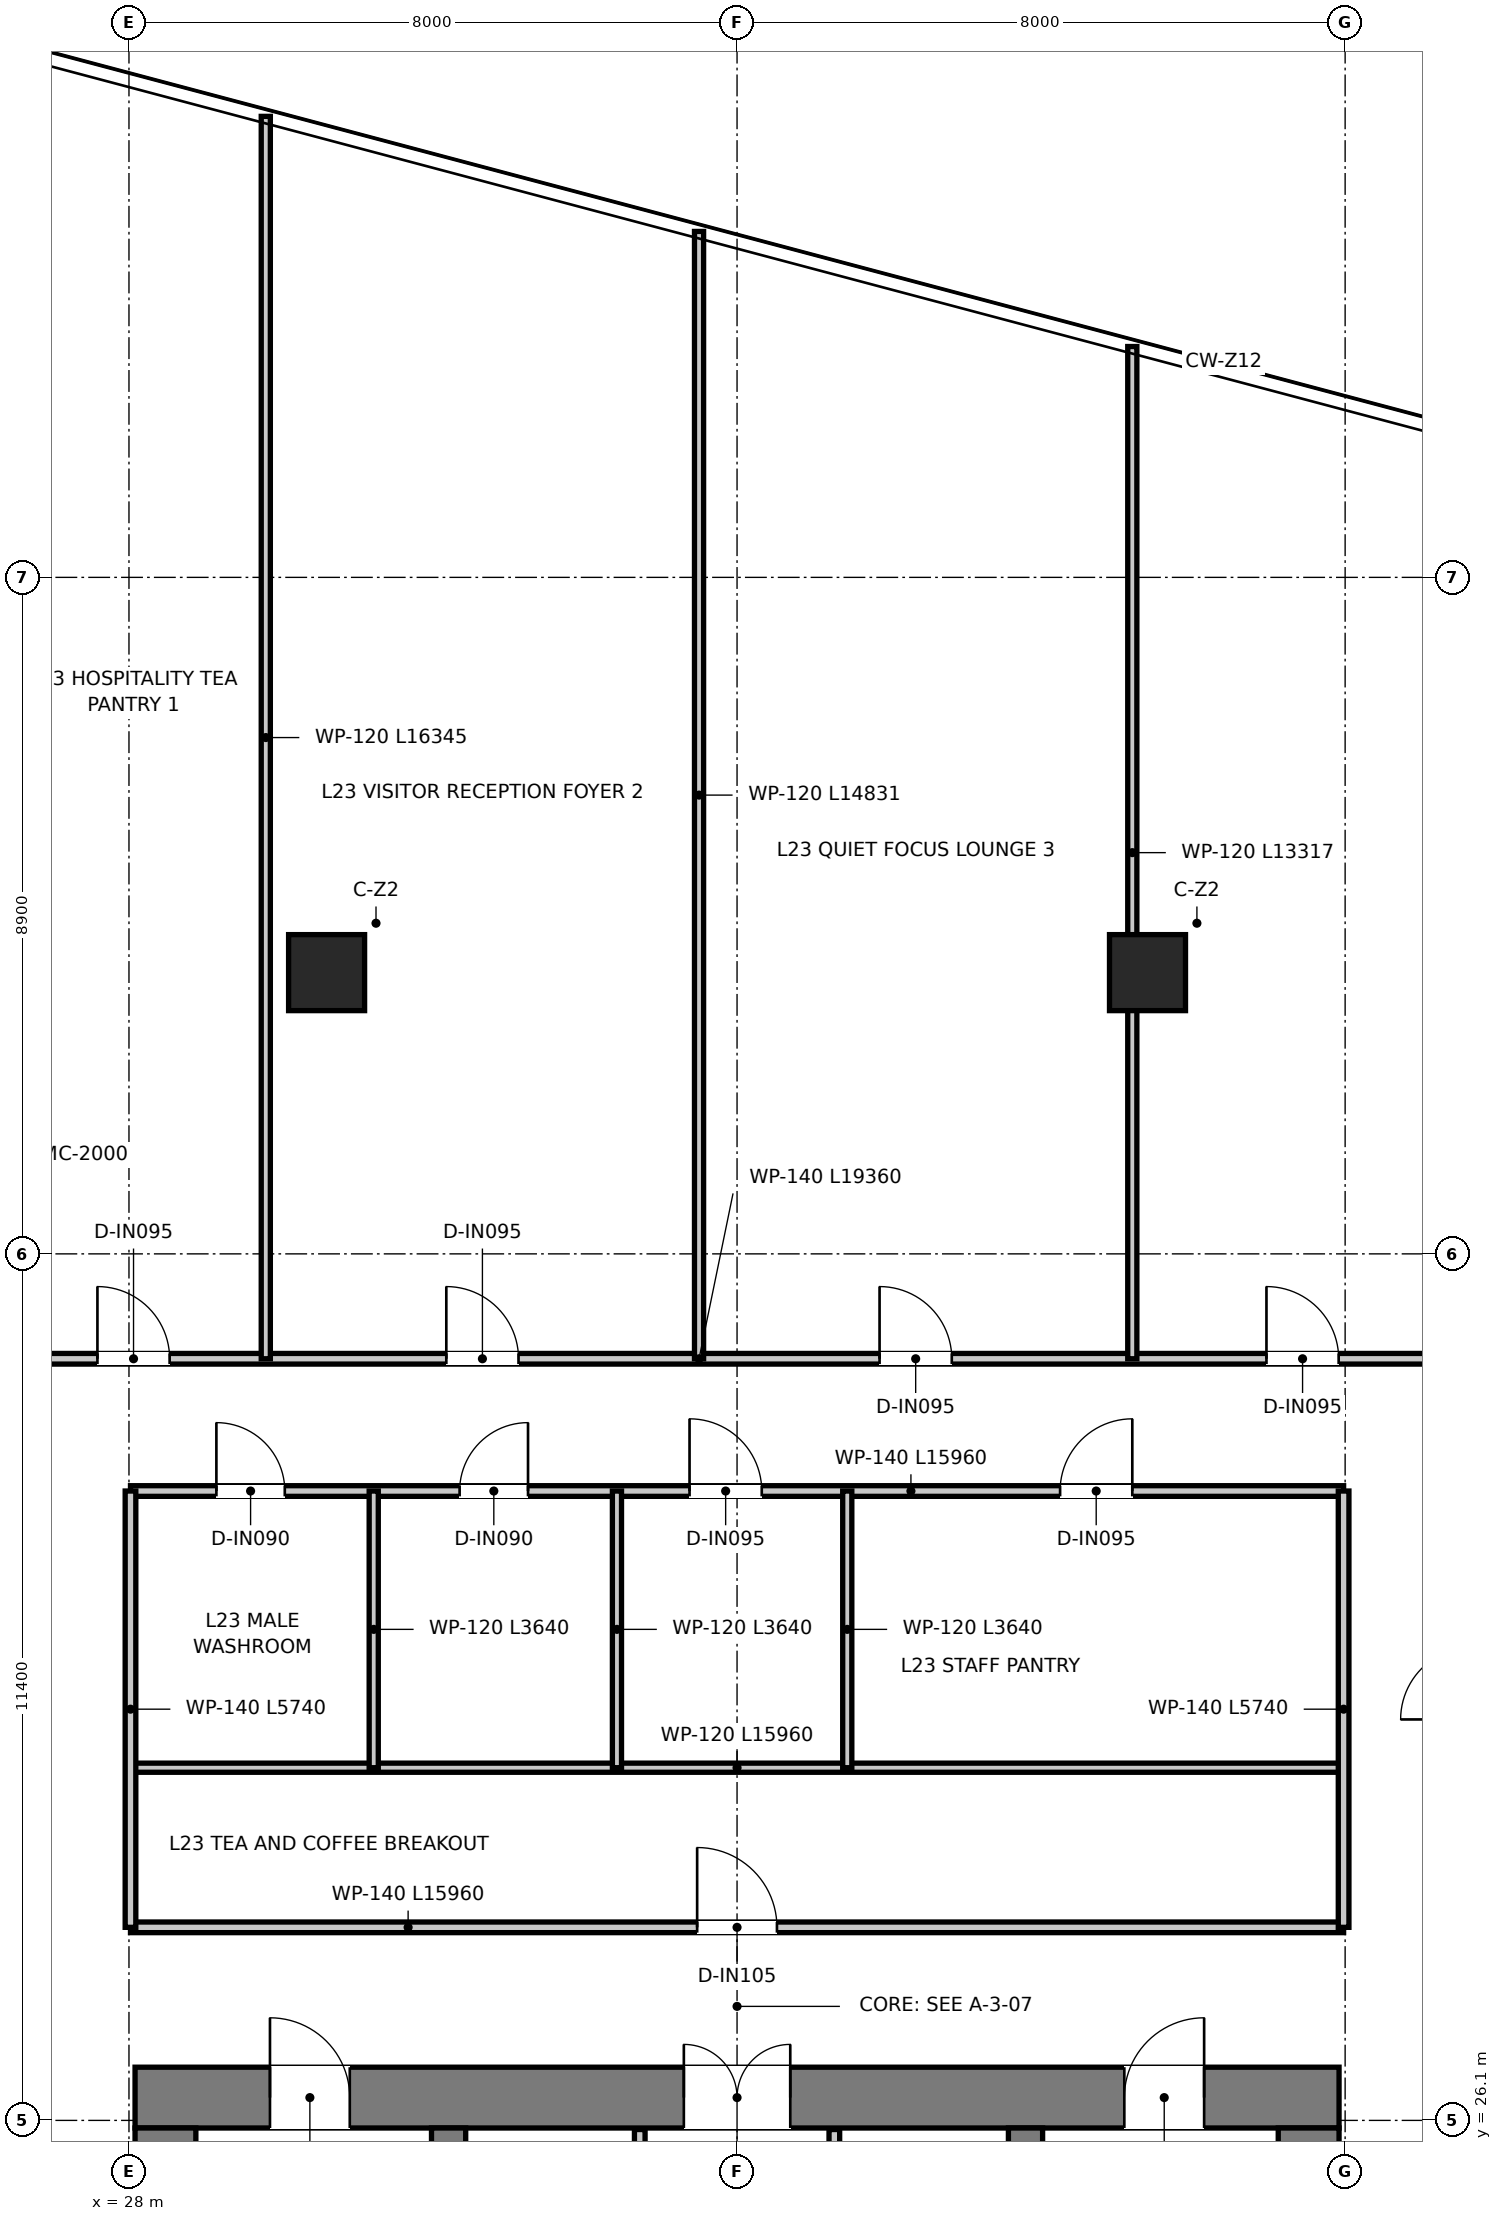
"""IFC4 building model, lengths in metres.
Left out: names, types, materials, properties, quantities, classifications, styles, units other than length and angle.
Written with IfcOpenShell. Run it as: python <this file> out.ifc"""

import sys

from ifc_helpers import new_model, si_unit, direction, frame, frame_2d, origin, origin_2d, place, context, subcontext, project, spatial, rectangle, extrude, source, transform, mapped, element, fill, save


model = new_model("IFC4")
c1 = context("Model", 3, precision=1e-05, world=origin(), true_north=direction((0.0, 1.0)))
c2 = subcontext(c1, "Body", "Model", "MODEL_VIEW")
j1 = project(units=[si_unit("LENGTHUNIT", "METRE"), si_unit("PLANEANGLEUNIT", "RADIAN")], contexts=[c1])
p1 = place(None, origin())
s1 = spatial("IfcSite", under=j1, at=p1, CompositionType="ELEMENT")
p2 = place(p1, origin())
s2 = spatial("IfcBuilding", under=s1, at=p2, CompositionType="ELEMENT")
p3 = place(p2, frame((0.0, 0.0, 97.95)))
s3 = spatial("IfcBuildingStorey", under=s2, at=p3, CompositionType="ELEMENT", Elevation=97.95)
p4 = place(p3, frame((28.08, 26.4, 0.0), z_axis=(0.0, 0.0, 1.0), x_axis=(1.0, 0.0, 0.0)))
e1 = element("IfcWall", 1, at=p4, inside=s3, PredefinedType="SHEAR", context=c2, shape_type="SweptSolid", body=[
    extrude(rectangle(XDim=15.84, YDim=0.8, at=frame_2d((7.92, 0.0))), origin(), (0.0, 0.0, 1.0), 3.95),
])
p5 = place(p4, frame((7.22, 0.0, 0.0)))
e2 = element("IfcOpeningElement", 2, at=p5, cuts=e1, PredefinedType="OPENING", context=c2, shape_type="SweptSolid", body=[
    extrude(rectangle(XDim=1.4, YDim=2.2, at=frame_2d((0.7, 1.1))), frame((0.0, 0.41, 0.0), z_axis=(0.0, -1.0, 0.0), x_axis=(1.0, 0.0, 0.0)), (0.0, 0.0, 1.0), 0.82),
])
p6 = place(p4, frame((1.775, 0.0, 0.0)))
e3 = element("IfcOpeningElement", 3, at=p6, cuts=e1, PredefinedType="OPENING", context=c2, shape_type="SweptSolid", body=[
    extrude(rectangle(XDim=1.05, YDim=2.1, at=frame_2d((0.525, 1.05))), frame((0.0, 0.41, 0.0), z_axis=(0.0, -1.0, 0.0), x_axis=(1.0, 0.0, 0.0)), (0.0, 0.0, 1.0), 0.82),
])
p7 = place(p4, frame((13.015, 0.0, 0.0)))
e4 = element("IfcOpeningElement", 4, at=p7, cuts=e1, PredefinedType="OPENING", context=c2, shape_type="SweptSolid", body=[
    extrude(rectangle(XDim=1.05, YDim=2.1, at=frame_2d((0.525, 1.05))), frame((0.0, 0.41, 0.0), z_axis=(0.0, -1.0, 0.0), x_axis=(1.0, 0.0, 0.0)), (0.0, 0.0, 1.0), 0.82),
])
for number, where, z_axis, x_axis in (
    (5, (28.48, 11.3, 0.0), (0.0, 0.0, 1.0), (0.0, 1.0, 0.0)),
    (6, (43.52, 11.3, 0.0), (0.0, 0.0, 1.0), (0.0, 1.0, 0.0)),
):
    element("IfcWall", number, at=place(p3, frame(where, z_axis=z_axis, x_axis=x_axis)), inside=s3, PredefinedType="SHEAR", context=c2, shape_type="SweptSolid", body=[
        extrude(rectangle(XDim=14.7, YDim=0.8, at=frame_2d((7.35, 0.0))), origin(), (0.0, 0.0, 1.0), 3.95),
    ])
p8 = place(p3, frame((32.205, 13.22, 0.0), z_axis=(0.0, 0.0, 1.0), x_axis=(0.0, 1.0, 0.0)))
e7 = element("IfcWall", 7, at=p8, inside=s3, PredefinedType="SHEAR", context=c2, shape_type="SweptSolid", body=[
    extrude(rectangle(XDim=12.78, YDim=0.45, at=frame_2d((6.39, 0.0))), origin(), (0.0, 0.0, 1.0), 3.95),
])
p9 = place(p8, frame((10.58, 0.0, 0.0)))
e8 = element("IfcOpeningElement", 8, at=p9, cuts=e7, PredefinedType="OPENING", context=c2, shape_type="SweptSolid", body=[
    extrude(rectangle(XDim=1.1, YDim=2.15, at=frame_2d((0.55, 1.075))), frame((0.0, 0.235, 0.0), z_axis=(0.0, -1.0, 0.0), x_axis=(1.0, 0.0, 0.0)), (0.0, 0.0, 1.0), 0.47),
])
p10 = place(p3, frame((39.795, 13.22, 0.0), z_axis=(0.0, 0.0, 1.0), x_axis=(0.0, 1.0, 0.0)))
e9 = element("IfcWall", 9, at=p10, inside=s3, PredefinedType="SHEAR", context=c2, shape_type="SweptSolid", body=[
    extrude(rectangle(XDim=12.78, YDim=0.45, at=frame_2d((6.39, 0.0))), origin(), (0.0, 0.0, 1.0), 3.95),
])
p11 = place(p10, frame((10.58, 0.0, 0.0)))
e10 = element("IfcOpeningElement", 10, at=p11, cuts=e9, PredefinedType="OPENING", context=c2, shape_type="SweptSolid", body=[
    extrude(rectangle(XDim=1.1, YDim=2.15, at=frame_2d((0.55, 1.075))), frame((0.0, 0.235, 0.0), z_axis=(0.0, -1.0, 0.0), x_axis=(1.0, 0.0, 0.0)), (0.0, 0.0, 1.0), 0.47),
])
m1 = source(origin(), c2, "Body", "SweptSolid", [
    extrude(rectangle(XDim=1.0, YDim=1.0, at=origin_2d()), origin(), (0.0, 0.0, 1.0), 3.95),
])
for number, where, z_axis, x_axis in (
    (11, (30.6, 41.2, 0.0), (0.0, 0.0, 1.0), (1.0, 0.0, 0.0)),
    (12, (41.4, 41.2, 0.0), (0.0, 0.0, 1.0), (1.0, 0.0, 0.0)),
):
    element("IfcColumn", number, at=place(p3, frame(where, z_axis=z_axis, x_axis=x_axis)), inside=s3, PredefinedType="COLUMN", context=c2, shape_type="MappedRepresentation", body=[
        mapped(m1, transform((0.0, 0.0, 0.0), x_axis=(1.0, 0.0, 0.0), y_axis=(0.0, 1.0, 0.0), z_axis=(0.0, 0.0, 1.0), scale=1.0)),
    ])
p12 = place(p3, frame((34.72, 20.2, 0.0), z_axis=(0.0, 0.0, 1.0), x_axis=(0.0, 1.0, 0.0)))
e13 = element("IfcWall", 13, at=p12, inside=s3, PredefinedType="PARTITIONING", context=c2, shape_type="SweptSolid", body=[
    extrude(rectangle(XDim=5.78, YDim=0.14, at=frame_2d((2.89, 0.0))), origin(), (0.0, 0.0, 1.0), 2.47),
])
p13 = place(p12, frame((1.05, 0.0, 0.0)))
e14 = element("IfcOpeningElement", 14, at=p13, cuts=e13, PredefinedType="OPENING", context=c2, shape_type="SweptSolid", body=[
    extrude(rectangle(XDim=0.9, YDim=2.1, at=frame_2d((0.45, 1.05))), frame((0.0, 0.08, 0.0), z_axis=(0.0, -1.0, 0.0), x_axis=(1.0, 0.0, 0.0)), (0.0, 0.0, 1.0), 0.16),
])
p14 = place(p3, frame((37.28, 20.2, 0.0), z_axis=(0.0, 0.0, 1.0), x_axis=(0.0, 1.0, 0.0)))
e15 = element("IfcWall", 15, at=p14, inside=s3, PredefinedType="PARTITIONING", context=c2, shape_type="SweptSolid", body=[
    extrude(rectangle(XDim=5.78, YDim=0.14, at=frame_2d((2.89, 0.0))), origin(), (0.0, 0.0, 1.0), 2.47),
])
p15 = place(p14, frame((0.95, 0.0, 0.0)))
e16 = element("IfcOpeningElement", 16, at=p15, cuts=e15, PredefinedType="OPENING", context=c2, shape_type="SweptSolid", body=[
    extrude(rectangle(XDim=1.1, YDim=2.15, at=frame_2d((0.55, 1.075))), frame((0.0, 0.08, 0.0), z_axis=(0.0, -1.0, 0.0), x_axis=(1.0, 0.0, 0.0)), (0.0, 0.0, 1.0), 0.16),
])
p16 = place(p3, frame((28.02, 28.64, 0.0), z_axis=(0.0, 0.0, 1.0), x_axis=(1.0, 0.0, 0.0)))
e17 = element("IfcWall", 17, at=p16, inside=s3, PredefinedType="PARTITIONING", context=c2, shape_type="SweptSolid", body=[
    extrude(rectangle(XDim=15.96, YDim=0.14, at=frame_2d((7.98, 0.0))), origin(), (0.0, 0.0, 1.0), 3.08),
])
p17 = place(p16, frame((7.455, 0.0, 0.0)))
e18 = element("IfcOpeningElement", 18, at=p17, cuts=e17, PredefinedType="OPENING", context=c2, shape_type="SweptSolid", body=[
    extrude(rectangle(XDim=1.05, YDim=2.15, at=frame_2d((0.525, 1.075))), frame((0.0, 0.08, 0.0), z_axis=(0.0, -1.0, 0.0), x_axis=(1.0, 0.0, 0.0)), (0.0, 0.0, 1.0), 0.16),
])
p18 = place(p3, frame((28.02, 30.74, 0.0), z_axis=(0.0, 0.0, 1.0), x_axis=(1.0, 0.0, 0.0)))
e19 = element("IfcWall", 19, at=p18, inside=s3, PredefinedType="PARTITIONING", context=c2, shape_type="SweptSolid", body=[
    extrude(rectangle(XDim=15.96, YDim=0.12, at=frame_2d((7.98, 0.0))), origin(), (0.0, 0.0, 1.0), 3.08),
])
p19 = place(p3, frame((28.02, 34.38, 0.0), z_axis=(0.0, 0.0, 1.0), x_axis=(1.0, 0.0, 0.0)))
e20 = element("IfcWall", 20, at=p19, inside=s3, PredefinedType="PARTITIONING", context=c2, shape_type="SweptSolid", body=[
    extrude(rectangle(XDim=15.96, YDim=0.14, at=frame_2d((7.98, 0.0))), origin(), (0.0, 0.0, 1.0), 3.08),
])
p20 = place(p19, frame((1.13, 0.0, 0.0)))
e21 = element("IfcOpeningElement", 21, at=p20, cuts=e20, PredefinedType="OPENING", context=c2, shape_type="SweptSolid", body=[
    extrude(rectangle(XDim=0.9, YDim=2.1, at=frame_2d((0.45, 1.05))), frame((0.0, 0.08, 0.0), z_axis=(0.0, -1.0, 0.0), x_axis=(1.0, 0.0, 0.0)), (0.0, 0.0, 1.0), 0.16),
])
p21 = place(p19, frame((4.33, 0.0, 0.0)))
e22 = element("IfcOpeningElement", 22, at=p21, cuts=e20, PredefinedType="OPENING", context=c2, shape_type="SweptSolid", body=[
    extrude(rectangle(XDim=0.9, YDim=2.1, at=frame_2d((0.45, 1.05))), frame((0.0, 0.08, 0.0), z_axis=(0.0, -1.0, 0.0), x_axis=(1.0, 0.0, 0.0)), (0.0, 0.0, 1.0), 0.16),
])
p22 = place(p19, frame((7.355, 0.0, 0.0)))
e23 = element("IfcOpeningElement", 23, at=p22, cuts=e20, PredefinedType="OPENING", context=c2, shape_type="SweptSolid", body=[
    extrude(rectangle(XDim=0.95, YDim=2.1, at=frame_2d((0.475, 1.05))), frame((0.0, 0.08, 0.0), z_axis=(0.0, -1.0, 0.0), x_axis=(1.0, 0.0, 0.0)), (0.0, 0.0, 1.0), 0.16),
])
p23 = place(p19, frame((12.23, 0.0, 0.0)))
e24 = element("IfcOpeningElement", 24, at=p23, cuts=e20, PredefinedType="OPENING", context=c2, shape_type="SweptSolid", body=[
    extrude(rectangle(XDim=0.95, YDim=2.1, at=frame_2d((0.475, 1.05))), frame((0.0, 0.08, 0.0), z_axis=(0.0, -1.0, 0.0), x_axis=(1.0, 0.0, 0.0)), (0.0, 0.0, 1.0), 0.16),
])
for number, where, z_axis, x_axis in (
    (25, (28.02, 28.64, 0.0), (0.0, 0.0, 1.0), (0.0, 1.0, 0.0)),
    (26, (43.98, 28.64, 0.0), (0.0, 0.0, 1.0), (0.0, 1.0, 0.0)),
):
    element("IfcWall", number, at=place(p3, frame(where, z_axis=z_axis, x_axis=x_axis)), inside=s3, PredefinedType="PARTITIONING", context=c2, shape_type="SweptSolid", body=[
        extrude(rectangle(XDim=5.74, YDim=0.14, at=frame_2d((2.87, 0.0))), origin(), (0.0, 0.0, 1.0), 3.27),
    ])
for number, where, z_axis, x_axis in (
    (27, (31.22, 30.74, 0.0), (0.0, 0.0, 1.0), (0.0, 1.0, 0.0)),
    (28, (34.42, 30.74, 0.0), (0.0, 0.0, 1.0), (0.0, 1.0, 0.0)),
    (29, (37.45, 30.74, 0.0), (0.0, 0.0, 1.0), (0.0, 1.0, 0.0)),
):
    element("IfcWall", number, at=place(p3, frame(where, z_axis=z_axis, x_axis=x_axis)), inside=s3, PredefinedType="PARTITIONING", context=c2, shape_type="SweptSolid", body=[
        extrude(rectangle(XDim=3.64, YDim=0.12, at=frame_2d((1.82, 0.0))), origin(), (0.0, 0.0, 1.0), 3.17),
    ])
p24 = place(p3, frame((26.32, 36.12, 0.0), z_axis=(0.0, 0.0, 1.0), x_axis=(1.0, 0.0, 0.0)))
e30 = element("IfcWall", 30, at=p24, inside=s3, PredefinedType="PARTITIONING", context=c2, shape_type="SweptSolid", body=[
    extrude(rectangle(XDim=19.36, YDim=0.14, at=frame_2d((9.68, 0.0))), origin(), (0.0, 0.0, 1.0), 3.08),
])
p25 = place(p24, frame((1.265, 0.0, 0.0)))
e31 = element("IfcOpeningElement", 31, at=p25, cuts=e30, PredefinedType="OPENING", context=c2, shape_type="SweptSolid", body=[
    extrude(rectangle(XDim=0.95, YDim=2.1, at=frame_2d((0.475, 1.05))), frame((0.0, 0.08, 0.0), z_axis=(0.0, -1.0, 0.0), x_axis=(1.0, 0.0, 0.0)), (0.0, 0.0, 1.0), 0.16),
])
p26 = place(p24, frame((5.855, 0.0, 0.0)))
e32 = element("IfcOpeningElement", 32, at=p26, cuts=e30, PredefinedType="OPENING", context=c2, shape_type="SweptSolid", body=[
    extrude(rectangle(XDim=0.95, YDim=2.1, at=frame_2d((0.475, 1.05))), frame((0.0, 0.08, 0.0), z_axis=(0.0, -1.0, 0.0), x_axis=(1.0, 0.0, 0.0)), (0.0, 0.0, 1.0), 0.16),
])
p27 = place(p24, frame((11.555, 0.0, 0.0)))
e33 = element("IfcOpeningElement", 33, at=p27, cuts=e30, PredefinedType="OPENING", context=c2, shape_type="SweptSolid", body=[
    extrude(rectangle(XDim=0.95, YDim=2.1, at=frame_2d((0.475, 1.05))), frame((0.0, 0.08, 0.0), z_axis=(0.0, -1.0, 0.0), x_axis=(1.0, 0.0, 0.0)), (0.0, 0.0, 1.0), 0.16),
])
p28 = place(p24, frame((16.645, 0.0, 0.0)))
e34 = element("IfcOpeningElement", 34, at=p28, cuts=e30, PredefinedType="OPENING", context=c2, shape_type="SweptSolid", body=[
    extrude(rectangle(XDim=0.95, YDim=2.1, at=frame_2d((0.475, 1.05))), frame((0.0, 0.08, 0.0), z_axis=(0.0, -1.0, 0.0), x_axis=(1.0, 0.0, 0.0)), (0.0, 0.0, 1.0), 0.16),
])
p29 = place(p3, frame((29.8, 36.12, 0.0), z_axis=(0.0, 0.0, 1.0), x_axis=(0.0, 1.0, 0.0)))
e35 = element("IfcWall", 35, at=p29, inside=s3, PredefinedType="PARTITIONING", context=c2, shape_type="SweptSolid", body=[
    extrude(rectangle(XDim=16.345, YDim=0.12, at=frame_2d((8.172, 0.0))), origin(), (0.0, 0.0, 1.0), 2.97),
])
p30 = place(p3, frame((35.5, 36.12, 0.0), z_axis=(0.0, 0.0, 1.0), x_axis=(0.0, 1.0, 0.0)))
e36 = element("IfcWall", 36, at=p30, inside=s3, PredefinedType="PARTITIONING", context=c2, shape_type="SweptSolid", body=[
    extrude(rectangle(XDim=14.831, YDim=0.12, at=frame_2d((7.416, 0.0))), origin(), (0.0, 0.0, 1.0), 2.97),
])
p31 = place(p3, frame((41.2, 36.12, 0.0), z_axis=(0.0, 0.0, 1.0), x_axis=(0.0, 1.0, 0.0)))
e37 = element("IfcWall", 37, at=p31, inside=s3, PredefinedType="PARTITIONING", context=c2, shape_type="SweptSolid", body=[
    extrude(rectangle(XDim=13.317, YDim=0.12, at=frame_2d((6.658, 0.0))), origin(), (0.0, 0.0, 1.0), 2.97),
])
p32 = place(p5, origin())
e38 = element("IfcDoor", 38, at=p32, inside=s3, OperationType="DOUBLE_DOOR_SINGLE_SWING", PredefinedType="DOOR", context=c2, shape_type="SweptSolid", body=[
    extrude(rectangle(XDim=1.4, YDim=2.2, at=frame_2d((0.7, 1.1))), frame((0.0, 0.025, 0.0), z_axis=(0.0, -1.0, 0.0), x_axis=(1.0, 0.0, 0.0)), (0.0, 0.0, 1.0), 0.05),
])
fill(e2, e38)
p33 = place(p6, origin())
e39 = element("IfcDoor", 39, at=p33, inside=s3, OperationType="SINGLE_SWING_LEFT", PredefinedType="DOOR", context=c2, shape_type="SweptSolid", body=[
    extrude(rectangle(XDim=1.05, YDim=2.1, at=frame_2d((0.525, 1.05))), frame((0.0, 0.025, 0.0), z_axis=(0.0, -1.0, 0.0), x_axis=(1.0, 0.0, 0.0)), (0.0, 0.0, 1.0), 0.05),
])
fill(e3, e39)
p34 = place(p7, origin())
e40 = element("IfcDoor", 40, at=p34, inside=s3, OperationType="SINGLE_SWING_RIGHT", PredefinedType="DOOR", context=c2, shape_type="SweptSolid", body=[
    extrude(rectangle(XDim=1.05, YDim=2.1, at=frame_2d((0.525, 1.05))), frame((0.0, 0.025, 0.0), z_axis=(0.0, -1.0, 0.0), x_axis=(1.0, 0.0, 0.0)), (0.0, 0.0, 1.0), 0.05),
])
fill(e4, e40)
p35 = place(p17, origin())
e41 = element("IfcDoor", 41, at=p35, inside=s3, OperationType="SINGLE_SWING_LEFT", PredefinedType="DOOR", context=c2, shape_type="SweptSolid", body=[
    extrude(rectangle(XDim=1.05, YDim=2.15, at=frame_2d((0.525, 1.075))), frame((0.0, 0.025, 0.0), z_axis=(0.0, -1.0, 0.0), x_axis=(1.0, 0.0, 0.0)), (0.0, 0.0, 1.0), 0.05),
])
fill(e18, e41)
p36 = place(p20, origin())
e42 = element("IfcDoor", 42, at=p36, inside=s3, OperationType="SINGLE_SWING_LEFT", PredefinedType="DOOR", context=c2, shape_type="SweptSolid", body=[
    extrude(rectangle(XDim=0.9, YDim=2.1, at=frame_2d((0.45, 1.05))), frame((0.0, 0.025, 0.0), z_axis=(0.0, -1.0, 0.0), x_axis=(1.0, 0.0, 0.0)), (0.0, 0.0, 1.0), 0.05),
])
fill(e21, e42)
p37 = place(p21, origin())
e43 = element("IfcDoor", 43, at=p37, inside=s3, OperationType="SINGLE_SWING_RIGHT", PredefinedType="DOOR", context=c2, shape_type="SweptSolid", body=[
    extrude(rectangle(XDim=0.9, YDim=2.1, at=frame_2d((0.45, 1.05))), frame((0.0, 0.025, 0.0), z_axis=(0.0, -1.0, 0.0), x_axis=(1.0, 0.0, 0.0)), (0.0, 0.0, 1.0), 0.05),
])
fill(e22, e43)
p38 = place(p22, origin())
e44 = element("IfcDoor", 44, at=p38, inside=s3, OperationType="SINGLE_SWING_LEFT", PredefinedType="DOOR", context=c2, shape_type="SweptSolid", body=[
    extrude(rectangle(XDim=0.95, YDim=2.1, at=frame_2d((0.475, 1.05))), frame((0.0, 0.025, 0.0), z_axis=(0.0, -1.0, 0.0), x_axis=(1.0, 0.0, 0.0)), (0.0, 0.0, 1.0), 0.05),
])
fill(e23, e44)
p39 = place(p23, origin())
e45 = element("IfcDoor", 45, at=p39, inside=s3, OperationType="SINGLE_SWING_RIGHT", PredefinedType="DOOR", context=c2, shape_type="SweptSolid", body=[
    extrude(rectangle(XDim=0.95, YDim=2.1, at=frame_2d((0.475, 1.05))), frame((0.0, 0.025, 0.0), z_axis=(0.0, -1.0, 0.0), x_axis=(1.0, 0.0, 0.0)), (0.0, 0.0, 1.0), 0.05),
])
fill(e24, e45)
p40 = place(p25, origin())
e46 = element("IfcDoor", 46, at=p40, inside=s3, OperationType="SINGLE_SWING_LEFT", PredefinedType="DOOR", context=c2, shape_type="SweptSolid", body=[
    extrude(rectangle(XDim=0.95, YDim=2.1, at=frame_2d((0.475, 1.05))), frame((0.0, 0.025, 0.0), z_axis=(0.0, -1.0, 0.0), x_axis=(1.0, 0.0, 0.0)), (0.0, 0.0, 1.0), 0.05),
])
fill(e31, e46)
p41 = place(p26, origin())
e47 = element("IfcDoor", 47, at=p41, inside=s3, OperationType="SINGLE_SWING_LEFT", PredefinedType="DOOR", context=c2, shape_type="SweptSolid", body=[
    extrude(rectangle(XDim=0.95, YDim=2.1, at=frame_2d((0.475, 1.05))), frame((0.0, 0.025, 0.0), z_axis=(0.0, -1.0, 0.0), x_axis=(1.0, 0.0, 0.0)), (0.0, 0.0, 1.0), 0.05),
])
fill(e32, e47)
p42 = place(p27, origin())
e48 = element("IfcDoor", 48, at=p42, inside=s3, OperationType="SINGLE_SWING_LEFT", PredefinedType="DOOR", context=c2, shape_type="SweptSolid", body=[
    extrude(rectangle(XDim=0.95, YDim=2.1, at=frame_2d((0.475, 1.05))), frame((0.0, 0.025, 0.0), z_axis=(0.0, -1.0, 0.0), x_axis=(1.0, 0.0, 0.0)), (0.0, 0.0, 1.0), 0.05),
])
fill(e33, e48)
p43 = place(p28, origin())
e49 = element("IfcDoor", 49, at=p43, inside=s3, OperationType="SINGLE_SWING_LEFT", PredefinedType="DOOR", context=c2, shape_type="SweptSolid", body=[
    extrude(rectangle(XDim=0.95, YDim=2.1, at=frame_2d((0.475, 1.05))), frame((0.0, 0.025, 0.0), z_axis=(0.0, -1.0, 0.0), x_axis=(1.0, 0.0, 0.0)), (0.0, 0.0, 1.0), 0.05),
])
fill(e34, e49)
save(model, sys.argv[1])
